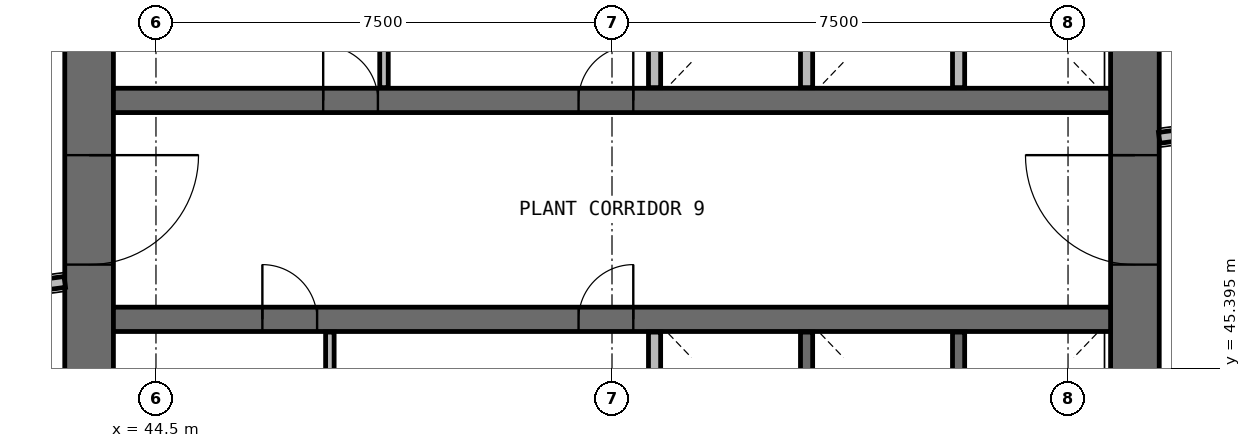
"""IFC4 building model, lengths in metres.
Left out: names, types, materials, properties, quantities, classifications, styles, units other than length and angle.
Written with IfcOpenShell. Run it as: python <this file> out.ifc"""

import sys

from ifc_helpers import new_model, si_unit, direction, frame, frame_2d, origin, place, context, subcontext, project, spatial, rectangle, extrude, source, transform, mapped, element, fill, save


model = new_model("IFC4")
c1 = context("Model", 3, precision=1e-05, world=origin(), true_north=direction((0.0, 1.0)))
c2 = subcontext(c1, "Body", "Model", "MODEL_VIEW")
j1 = project(units=[si_unit("LENGTHUNIT", "METRE"), si_unit("PLANEANGLEUNIT", "RADIAN")], contexts=[c1])
p1 = place(None, origin())
s1 = spatial("IfcSite", under=j1, at=p1, CompositionType="ELEMENT")
p2 = place(p1, origin())
s2 = spatial("IfcBuilding", under=s1, at=p2, CompositionType="ELEMENT")
p3 = place(p2, frame((0.0, 0.0, 179.9)))
s3 = spatial("IfcBuildingStorey", under=s2, at=p3, CompositionType="ELEMENT", Elevation=179.9)
p4 = place(p3, frame((60.6, 40.0, 0.0), z_axis=(0.0, 0.0, 1.0), x_axis=(0.0, 1.0, 0.0)))
e1 = element("IfcWall", 1, at=p4, inside=s3, PredefinedType="SHEAR", context=c2, shape_type="SweptSolid", body=[
    extrude(rectangle(XDim=16.0, YDim=0.8, at=frame_2d((8.0, 0.0))), origin(), (0.0, 0.0, 1.0), 3.9),
])
p5 = place(p4, frame((7.1, 0.0, 0.0)))
e2 = element("IfcOpeningElement", 2, at=p5, cuts=e1, PredefinedType="OPENING", context=c2, shape_type="SweptSolid", body=[
    extrude(rectangle(XDim=1.8, YDim=2.1, at=frame_2d((0.9, 1.05))), frame((0.0, 0.41, 0.0), z_axis=(0.0, -1.0, 0.0), x_axis=(1.0, 0.0, 0.0)), (0.0, 0.0, 1.0), 0.82),
])
p6 = place(p3, frame((43.4, 56.0, 0.0), z_axis=(0.0, 0.0, 1.0), x_axis=(0.0, -1.0, 0.0)))
e3 = element("IfcWall", 3, at=p6, inside=s3, PredefinedType="SHEAR", context=c2, shape_type="SweptSolid", body=[
    extrude(rectangle(XDim=16.0, YDim=0.8, at=frame_2d((8.0, 0.0))), origin(), (0.0, 0.0, 1.0), 3.9),
])
p7 = place(p6, frame((7.1, 0.0, 0.0)))
e4 = element("IfcOpeningElement", 4, at=p7, cuts=e3, PredefinedType="OPENING", context=c2, shape_type="SweptSolid", body=[
    extrude(rectangle(XDim=1.8, YDim=2.1, at=frame_2d((0.9, 1.05))), frame((0.0, 0.41, 0.0), z_axis=(0.0, -1.0, 0.0), x_axis=(1.0, 0.0, 0.0)), (0.0, 0.0, 1.0), 0.82),
])
p8 = place(p3, frame((43.8, 49.8, 0.0), z_axis=(0.0, 0.0, 1.0), x_axis=(1.0, 0.0, 0.0)))
e5 = element("IfcWall", 5, at=p8, inside=s3, PredefinedType="SHEAR", context=c2, shape_type="SweptSolid", body=[
    extrude(rectangle(XDim=16.4, YDim=0.4, at=frame_2d((8.2, 0.0))), origin(), (0.0, 0.0, 1.0), 3.9),
])
p9 = place(p8, frame((3.45, 0.0, 0.0)))
e6 = element("IfcOpeningElement", 6, at=p9, cuts=e5, PredefinedType="OPENING", context=c2, shape_type="SweptSolid", body=[
    extrude(rectangle(XDim=0.9, YDim=2.1, at=frame_2d((0.45, 1.05))), frame((0.0, 0.21, 0.0), z_axis=(0.0, -1.0, 0.0), x_axis=(1.0, 0.0, 0.0)), (0.0, 0.0, 1.0), 0.42),
])
p10 = place(p8, frame((7.65, 0.0, 0.0)))
e7 = element("IfcOpeningElement", 7, at=p10, cuts=e5, PredefinedType="OPENING", context=c2, shape_type="SweptSolid", body=[
    extrude(rectangle(XDim=0.9, YDim=2.1, at=frame_2d((0.45, 1.05))), frame((0.0, 0.21, 0.0), z_axis=(0.0, -1.0, 0.0), x_axis=(1.0, 0.0, 0.0)), (0.0, 0.0, 1.0), 0.42),
])
p11 = place(p3, frame((43.8, 46.2, 0.0), z_axis=(0.0, 0.0, 1.0), x_axis=(1.0, 0.0, 0.0)))
e8 = element("IfcWall", 8, at=p11, inside=s3, PredefinedType="SHEAR", context=c2, shape_type="SweptSolid", body=[
    extrude(rectangle(XDim=16.4, YDim=0.4, at=frame_2d((8.2, 0.0))), origin(), (0.0, 0.0, 1.0), 3.9),
])
p12 = place(p11, frame((2.45, 0.0, 0.0)))
e9 = element("IfcOpeningElement", 9, at=p12, cuts=e8, PredefinedType="OPENING", context=c2, shape_type="SweptSolid", body=[
    extrude(rectangle(XDim=0.9, YDim=2.1, at=frame_2d((0.45, 1.05))), frame((0.0, 0.21, 0.0), z_axis=(0.0, -1.0, 0.0), x_axis=(1.0, 0.0, 0.0)), (0.0, 0.0, 1.0), 0.42),
])
p13 = place(p11, frame((7.65, 0.0, 0.0)))
e10 = element("IfcOpeningElement", 10, at=p13, cuts=e8, PredefinedType="OPENING", context=c2, shape_type="SweptSolid", body=[
    extrude(rectangle(XDim=0.9, YDim=2.1, at=frame_2d((0.45, 1.05))), frame((0.0, 0.21, 0.0), z_axis=(0.0, -1.0, 0.0), x_axis=(1.0, 0.0, 0.0)), (0.0, 0.0, 1.0), 0.42),
])
for number, where, z_axis, x_axis in (
    (11, (52.7, 45.99, 0.0), (0.0, 0.0, 1.0), (0.0, -1.0, 0.0)),
    (12, (52.7, 52.37, 0.0), (0.0, 0.0, 1.0), (0.0, -1.0, 0.0)),
    (13, (55.2, 43.63, 0.0), (0.0, 0.0, 1.0), (0.0, 1.0, 0.0)),
    (14, (55.2, 50.01, 0.0), (0.0, 0.0, 1.0), (0.0, 1.0, 0.0)),
    (15, (57.7, 43.63, 0.0), (0.0, 0.0, 1.0), (0.0, 1.0, 0.0)),
):
    element("IfcWall", number, at=place(p3, frame(where, z_axis=z_axis, x_axis=x_axis)), inside=s3, PredefinedType="SOLIDWALL", context=c2, shape_type="SweptSolid", body=[
        extrude(rectangle(XDim=2.36, YDim=0.2, at=frame_2d((1.18, 0.0))), origin(), (0.0, 0.0, 1.0), 3.58),
    ])
p14 = place(p3, frame((57.7, 50.01, 0.0), z_axis=(0.0, 0.0, 1.0), x_axis=(0.0, 1.0, 0.0)))
e16 = element("IfcWall", 16, at=p14, inside=s3, PredefinedType="SOLIDWALL", context=c2, shape_type="SweptSolid", body=[
    extrude(rectangle(XDim=2.39, YDim=0.2, at=frame_2d((1.195, 0.0))), origin(), (0.0, 0.0, 1.0), 3.58),
])
p15 = place(p3, frame((40.69, 46.511, 0.0), z_axis=(0.0, 0.0, 1.0), x_axis=(0.991440737811, 0.130557509967, 0.0)))
e17 = element("IfcWall", 17, at=p15, inside=s3, PredefinedType="PARTITIONING", context=c2, shape_type="SweptSolid", body=[
    extrude(rectangle(XDim=2.33, YDim=0.18, at=frame_2d((1.165, 0.0))), origin(), (0.0, 0.0, 1.0), 2.38),
])
p16 = place(p15, frame((0.48, 0.0, 0.0)))
e18 = element("IfcOpeningElement", 18, at=p16, cuts=e17, PredefinedType="OPENING", context=c2, shape_type="SweptSolid", body=[
    extrude(rectangle(XDim=1.2, YDim=2.1, at=frame_2d((0.6, 1.05))), frame((0.0, 0.1, 0.0), z_axis=(0.0, -1.0, 0.0), x_axis=(1.0, 0.0, 0.0)), (0.0, 0.0, 1.0), 0.2),
])
p17 = place(p3, frame((63.31, 49.489, 0.0), z_axis=(0.0, 0.0, 1.0), x_axis=(-0.991440737811, -0.130557509967, 0.0)))
e19 = element("IfcWall", 19, at=p17, inside=s3, PredefinedType="PARTITIONING", context=c2, shape_type="SweptSolid", body=[
    extrude(rectangle(XDim=2.33, YDim=0.18, at=frame_2d((1.165, 0.0))), origin(), (0.0, 0.0, 1.0), 2.38),
])
p18 = place(p17, frame((0.48, 0.0, 0.0)))
e20 = element("IfcOpeningElement", 20, at=p18, cuts=e19, PredefinedType="OPENING", context=c2, shape_type="SweptSolid", body=[
    extrude(rectangle(XDim=1.2, YDim=2.1, at=frame_2d((0.6, 1.05))), frame((0.0, 0.1, 0.0), z_axis=(0.0, -1.0, 0.0), x_axis=(1.0, 0.0, 0.0)), (0.0, 0.0, 1.0), 0.2),
])
for number, where, z_axis, x_axis in (
    (21, (47.36, 43.7, 0.0), (0.0, 0.0, 1.0), (0.0, 1.0, 0.0)),
    (22, (48.25, 50.01, 0.0), (0.0, 0.0, 1.0), (0.0, 1.0, 0.0)),
):
    element("IfcWall", number, at=place(p3, frame(where, z_axis=z_axis, x_axis=x_axis)), inside=s3, PredefinedType="PARTITIONING", context=c2, shape_type="SweptSolid", body=[
        extrude(rectangle(XDim=2.29, YDim=0.14, at=frame_2d((1.145, 0.0))), origin(), (0.0, 0.0, 1.0), 2.88),
    ])
m1 = source(origin(), c2, "Body", "SweptSolid", [
    extrude(rectangle(XDim=1.8, YDim=2.1, at=frame_2d((0.9, 1.05))), frame((0.0, 0.025, 0.0), z_axis=(0.0, -1.0, 0.0), x_axis=(1.0, 0.0, 0.0)), (0.0, 0.0, 1.0), 0.05),
])
p19 = place(p7, origin())
e23 = element("IfcDoor", 23, at=p19, inside=s3, OperationType="SINGLE_SWING_LEFT", PredefinedType="DOOR", context=c2, shape_type="MappedRepresentation", body=[
    mapped(m1, transform((0.0, 0.0, 0.0), scale=1.0)),
])
fill(e4, e23)
p20 = place(p5, origin())
e24 = element("IfcDoor", 24, at=p20, inside=s3, OperationType="SINGLE_SWING_RIGHT", PredefinedType="DOOR", context=c2, shape_type="MappedRepresentation", body=[
    mapped(m1, transform((0.0, 0.0, 0.0), scale=1.0)),
])
fill(e2, e24)
m2 = source(origin(), c2, "Body", "SweptSolid", [
    extrude(rectangle(XDim=0.9, YDim=2.1, at=frame_2d((0.45, 1.05))), frame((0.0, 0.025, 0.0), z_axis=(0.0, -1.0, 0.0), x_axis=(1.0, 0.0, 0.0)), (0.0, 0.0, 1.0), 0.05),
])
p21 = place(p9, origin())
e25 = element("IfcDoor", 25, at=p21, inside=s3, OperationType="SINGLE_SWING_LEFT", PredefinedType="DOOR", context=c2, shape_type="MappedRepresentation", body=[
    mapped(m2, transform((0.0, 0.0, 0.0), scale=1.0)),
])
fill(e6, e25)
p22 = place(p10, origin())
e26 = element("IfcDoor", 26, at=p22, inside=s3, OperationType="SINGLE_SWING_RIGHT", PredefinedType="DOOR", context=c2, shape_type="MappedRepresentation", body=[
    mapped(m2, transform((0.0, 0.0, 0.0), scale=1.0)),
])
fill(e7, e26)
p23 = place(p12, origin())
e27 = element("IfcDoor", 27, at=p23, inside=s3, OperationType="SINGLE_SWING_LEFT", PredefinedType="DOOR", context=c2, shape_type="MappedRepresentation", body=[
    mapped(m2, transform((0.0, 0.0, 0.0), scale=1.0)),
])
fill(e9, e27)
p24 = place(p13, origin())
e28 = element("IfcDoor", 28, at=p24, inside=s3, OperationType="SINGLE_SWING_RIGHT", PredefinedType="DOOR", context=c2, shape_type="MappedRepresentation", body=[
    mapped(m2, transform((0.0, 0.0, 0.0), scale=1.0)),
])
fill(e10, e28)
save(model, sys.argv[1])
